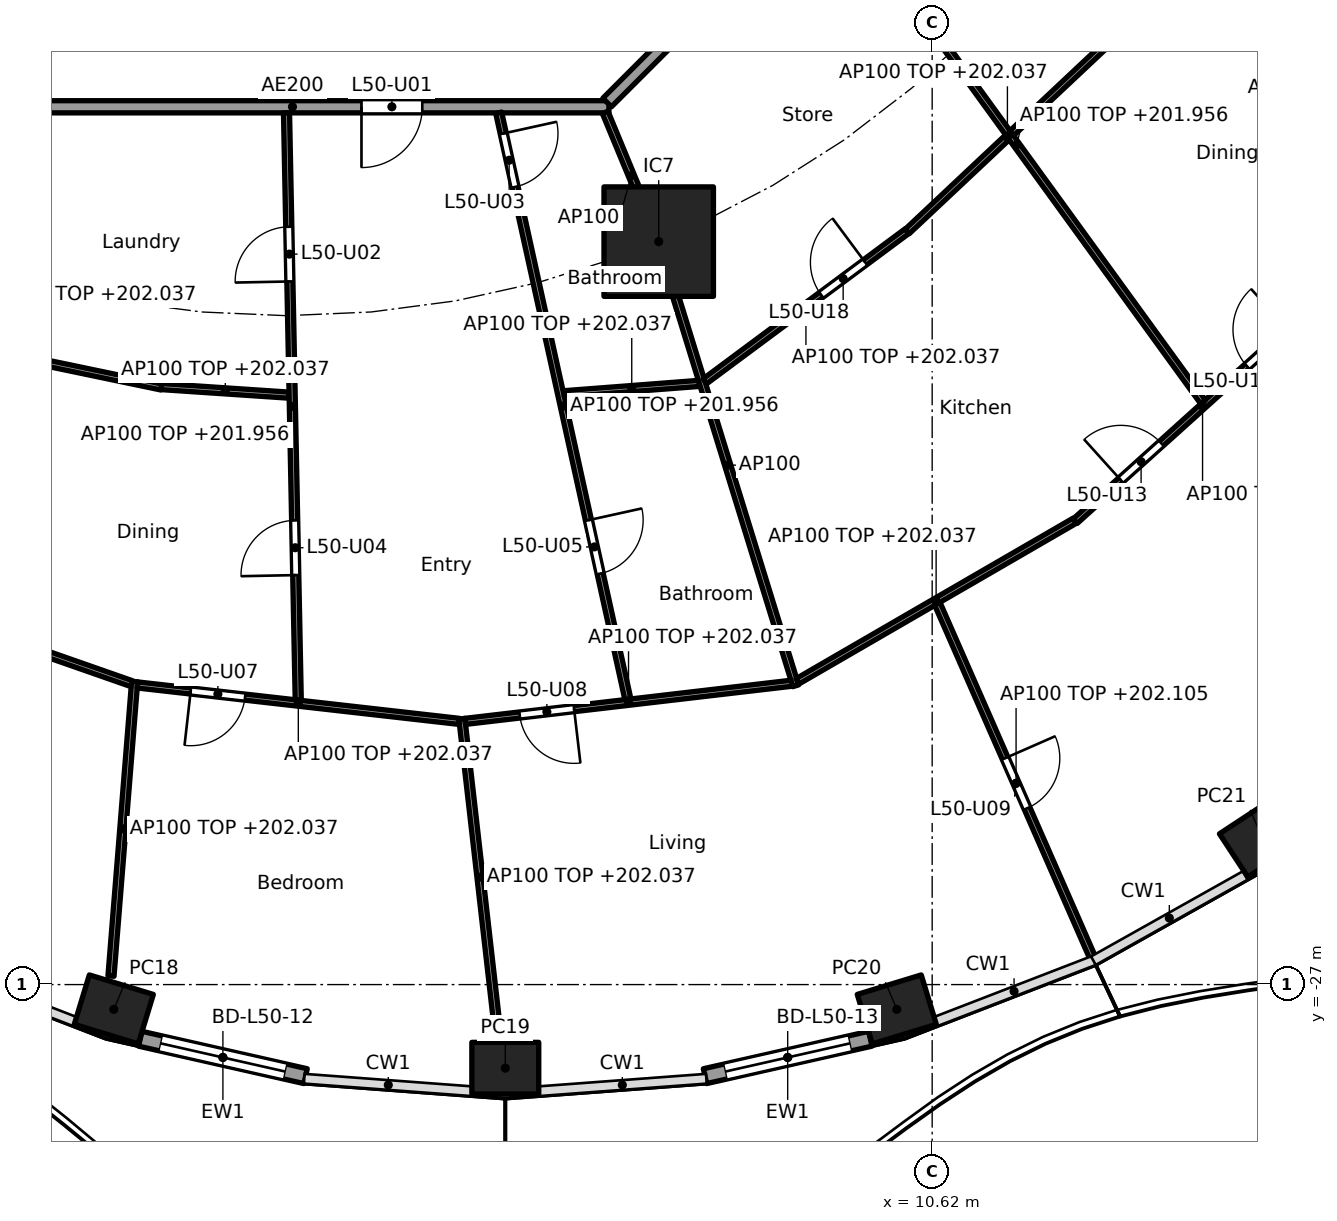
"""IFC4 building model, lengths in metres.
Left out: names, types, materials, properties, quantities, classifications, styles, units other than length and angle.
Written with IfcOpenShell. Run it as: python <this file> out.ifc"""

import sys

from ifc_helpers import new_model, si_unit, direction, frame, frame_2d, origin, origin_2d, place, context, subcontext, project, spatial, rectangle, hollow_rectangle, extrude, element, fill, save


model = new_model("IFC4")
c1 = context("Model", 3, precision=1e-05, world=origin(), true_north=direction((0.0, 1.0)))
c2 = subcontext(c1, "Body", "Model", "MODEL_VIEW")
j1 = project(units=[si_unit("LENGTHUNIT", "METRE"), si_unit("PLANEANGLEUNIT", "RADIAN")], contexts=[c1])
p1 = place(None, origin())
s1 = spatial("IfcSite", under=j1, at=p1, CompositionType="ELEMENT")
p2 = place(p1, origin())
s2 = spatial("IfcBuilding", under=s1, at=p2, CompositionType="ELEMENT")
p3 = place(p2, frame((0.0, 0.0, 199.2)))
s3 = spatial("IfcBuildingStorey", under=s2, at=p3, CompositionType="ELEMENT", Elevation=199.2)
for number, where, z_axis, x_axis in (
    (1, (-2.838, -27.408, 0.0), (0.0, 0.0, 1.0), (0.957, -0.292, 0.0)),
    (2, (3.6, -28.375, 0.0), (0.0, 0.0, 1.0), (1.0, 0.0, 0.0)),
    (3, (10.038, -27.408, 0.0), (0.0, 0.0, 1.0), (0.957, 0.292, 0.0)),
    (4, (16.038, -24.573, 0.0), (0.0, 0.0, 1.0), (0.836, 0.549, 0.0)),
):
    element("IfcColumn", number, at=place(p3, frame(where, z_axis=z_axis, x_axis=x_axis)), inside=s3, PredefinedType="COLUMN", context=c2, shape_type="SweptSolid", body=[
        extrude(hollow_rectangle(XDim=1.1, YDim=0.85, WallThickness=0.036, at=origin_2d()), origin(), (0.0, 0.0, 1.0), 3.7),
    ])
p4 = place(p3, frame((6.123, -14.782, 0.0), z_axis=(0.0, 0.0, 1.0), x_axis=(1.0, 0.0, 0.0)))
e5 = element("IfcColumn", 5, at=p4, inside=s3, PredefinedType="COLUMN", context=c2, shape_type="SweptSolid", body=[
    extrude(rectangle(XDim=1.8, YDim=1.8, at=origin_2d()), origin(), (0.0, 0.0, 1.0), 3.7),
])
p5 = place(p3, frame((0.315, -28.506, 0.0), z_axis=(0.0, 0.0, 1.0), x_axis=(-0.975324329911, 0.220776926974, 0.0)))
e6 = element("IfcWall", 6, at=p5, inside=s3, PredefinedType="SOLIDWALL", context=c2, shape_type="SweptSolid", body=[
    extrude(rectangle(XDim=2.788, YDim=0.25, at=frame_2d((1.394, 0.0))), origin(), (0.0, 0.0, 1.0), 3.44),
])
p6 = place(p5, frame((0.344, 0.0, 0.0)))
e7 = element("IfcOpeningElement", 7, at=p6, cuts=e6, PredefinedType="OPENING", context=c2, shape_type="SweptSolid", body=[
    extrude(rectangle(XDim=2.1, YDim=2.4, at=frame_2d((1.05, 1.2))), frame((0.0, 0.135, 0.0), z_axis=(0.0, -1.0, 0.0), x_axis=(1.0, 0.0, 0.0)), (0.0, 0.0, 1.0), 0.27),
])
p7 = place(p3, frame((9.604, -27.891, 0.0), z_axis=(0.0, 0.0, 1.0), x_axis=(-0.975324329911, -0.220776926974, 0.0)))
e8 = element("IfcWall", 8, at=p7, inside=s3, PredefinedType="SOLIDWALL", context=c2, shape_type="SweptSolid", body=[
    extrude(rectangle(XDim=2.788, YDim=0.25, at=frame_2d((1.394, 0.0))), origin(), (0.0, 0.0, 1.0), 3.44),
])
p8 = place(p7, frame((0.344, 0.0, 0.0)))
e9 = element("IfcOpeningElement", 9, at=p8, cuts=e8, PredefinedType="OPENING", context=c2, shape_type="SweptSolid", body=[
    extrude(rectangle(XDim=2.1, YDim=2.4, at=frame_2d((1.05, 1.2))), frame((0.0, 0.135, 0.0), z_axis=(0.0, -1.0, 0.0), x_axis=(1.0, 0.0, 0.0)), (0.0, 0.0, 1.0), 0.27),
])
p9 = place(p3, frame((-5.104, -12.565, 0.0), z_axis=(0.0, 0.0, 1.0), x_axis=(1.0, 0.0, 0.0)))
e10 = element("IfcWall", 10, at=p9, inside=s3, PredefinedType="PARTITIONING", context=c2, shape_type="SweptSolid", body=[
    extrude(rectangle(XDim=10.409, YDim=0.2, at=frame_2d((5.205, 0.0))), origin(), (0.0, 0.0, 1.0), 3.44),
])
p10 = place(p9, frame((6.339, 0.0, 0.0)))
e11 = element("IfcOpeningElement", 11, at=p10, cuts=e10, PredefinedType="OPENING", context=c2, shape_type="SweptSolid", body=[
    extrude(rectangle(XDim=1.0, YDim=2.1, at=frame_2d((0.5, 1.05))), frame((0.0, 0.11, 0.0), z_axis=(0.0, -1.0, 0.0), x_axis=(1.0, 0.0, 0.0)), (0.0, 0.0, 1.0), 0.22),
])
p11 = place(p3, frame((5.275, -12.494, 0.0), z_axis=(0.0, 0.0, 1.0), x_axis=(0.707106781187, 0.707106781187, 0.0)))
e12 = element("IfcWall", 12, at=p11, inside=s3, PredefinedType="PARTITIONING", context=c2, shape_type="SweptSolid", body=[
    extrude(rectangle(XDim=10.409, YDim=0.2, at=frame_2d((5.205, 0.0))), origin(), (0.0, 0.0, 1.0), 3.44),
])
p12 = place(p3, frame((-6.447, -16.256, 0.0), z_axis=(0.0, 0.0, 1.0), x_axis=(0.978902917122, -0.20432591331, 0.0)))
e13 = element("IfcWall", 13, at=p12, inside=s3, PredefinedType="PARTITIONING", context=c2, shape_type="SweptSolid", body=[
    extrude(rectangle(XDim=4.486, YDim=0.1, at=frame_2d((2.243, 0.0))), origin(), (0.0, 0.0, 1.0), 2.837),
])
p13 = place(p3, frame((-7.613, -20.278, 0.0), z_axis=(0.0, 0.0, 1.0), x_axis=(0.94391294884, -0.330194404878, 0.0)))
e14 = element("IfcWall", 14, at=p13, inside=s3, PredefinedType="PARTITIONING", context=c2, shape_type="SweptSolid", body=[
    extrude(rectangle(XDim=5.367, YDim=0.1, at=frame_2d((2.684, 0.0))), origin(), (0.0, 0.0, 1.0), 2.837),
])
p14 = place(p13, frame((2.234, 0.0, 0.0)))
e15 = element("IfcOpeningElement", 15, at=p14, cuts=e14, PredefinedType="OPENING", context=c2, shape_type="SweptSolid", body=[
    extrude(rectangle(XDim=0.9, YDim=2.1, at=frame_2d((0.45, 1.05))), frame((0.0, 0.06, 0.0), z_axis=(0.0, -1.0, 0.0), x_axis=(1.0, 0.0, 0.0)), (0.0, 0.0, 1.0), 0.12),
])
p15 = place(p3, frame((-2.055, -17.166, 0.0), z_axis=(0.0, 0.0, 1.0), x_axis=(0.997756833447, -0.06694252243, 0.0)))
e16 = element("IfcWall", 16, at=p15, inside=s3, PredefinedType="PARTITIONING", context=c2, shape_type="SweptSolid", body=[
    extrude(rectangle(XDim=2.104, YDim=0.1, at=frame_2d((1.052, 0.0))), origin(), (0.0, 0.0, 1.0), 2.837),
])
p16 = place(p3, frame((-2.495, -22.017, 0.0), z_axis=(0.0, 0.0, 1.0), x_axis=(-0.080150660566, -0.99678276049, 0.0)))
e17 = element("IfcWall", 17, at=p16, inside=s3, PredefinedType="PARTITIONING", context=c2, shape_type="SweptSolid", body=[
    extrude(rectangle(XDim=4.858, YDim=0.1, at=frame_2d((2.429, 0.0))), origin(), (0.0, 0.0, 1.0), 2.837),
])
p17 = place(p3, frame((-2.449, -22.073, 0.0), z_axis=(0.0, 0.0, 1.0), x_axis=(0.993660315081, -0.112424099879, 0.0)))
e18 = element("IfcWall", 18, at=p17, inside=s3, PredefinedType="PARTITIONING", context=c2, shape_type="SweptSolid", body=[
    extrude(rectangle(XDim=5.325, YDim=0.1, at=frame_2d((2.662, 0.0))), origin(), (0.0, 0.0, 1.0), 2.837),
])
p18 = place(p17, frame((0.881, 0.0, 0.0)))
e19 = element("IfcOpeningElement", 19, at=p18, cuts=e18, PredefinedType="OPENING", context=c2, shape_type="SweptSolid", body=[
    extrude(rectangle(XDim=0.9, YDim=2.1, at=frame_2d((0.45, 1.05))), frame((0.0, 0.06, 0.0), z_axis=(0.0, -1.0, 0.0), x_axis=(1.0, 0.0, 0.0)), (0.0, 0.0, 1.0), 0.12),
])
p19 = place(p3, frame((0.002, -12.665, 0.0), z_axis=(0.0, 0.0, 1.0), x_axis=(0.019992969345, -0.999800120613, 0.0)))
e20 = element("IfcWall", 20, at=p19, inside=s3, PredefinedType="PARTITIONING", context=c2, shape_type="SweptSolid", body=[
    extrude(rectangle(XDim=9.659, YDim=0.1, at=frame_2d((4.83, 0.0))), origin(), (0.0, 0.0, 1.0), 2.756),
])
p20 = place(p19, frame((1.873, 0.0, 0.0)))
e21 = element("IfcOpeningElement", 21, at=p20, cuts=e20, PredefinedType="OPENING", context=c2, shape_type="SweptSolid", body=[
    extrude(rectangle(XDim=0.9, YDim=2.1, at=frame_2d((0.45, 1.05))), frame((0.0, 0.06, 0.0), z_axis=(0.0, -1.0, 0.0), x_axis=(1.0, 0.0, 0.0)), (0.0, 0.0, 1.0), 0.12),
])
p21 = place(p19, frame((6.703, 0.0, 0.0)))
e22 = element("IfcOpeningElement", 22, at=p21, cuts=e20, PredefinedType="OPENING", context=c2, shape_type="SweptSolid", body=[
    extrude(rectangle(XDim=0.9, YDim=2.1, at=frame_2d((0.45, 1.05))), frame((0.0, 0.06, 0.0), z_axis=(0.0, -1.0, 0.0), x_axis=(1.0, 0.0, 0.0)), (0.0, 0.0, 1.0), 0.12),
])
p22 = place(p3, frame((2.885, -22.627, 0.0), z_axis=(0.0, 0.0, 1.0), x_axis=(0.113634556485, -0.993522615531, 0.0)))
e23 = element("IfcWall", 23, at=p22, inside=s3, PredefinedType="PARTITIONING", context=c2, shape_type="SweptSolid", body=[
    extrude(rectangle(XDim=5.244, YDim=0.1, at=frame_2d((2.622, 0.0))), origin(), (0.0, 0.0, 1.0), 2.837),
])
p23 = place(p3, frame((2.941, -22.671, 0.0), z_axis=(0.0, 0.0, 1.0), x_axis=(0.993245806382, 0.1160291692, 0.0)))
e24 = element("IfcWall", 24, at=p23, inside=s3, PredefinedType="PARTITIONING", context=c2, shape_type="SweptSolid", body=[
    extrude(rectangle(XDim=5.408, YDim=0.1, at=frame_2d((2.704, 0.0))), origin(), (0.0, 0.0, 1.0), 2.837),
])
p24 = place(p23, frame((0.902, 0.0, 0.0)))
e25 = element("IfcOpeningElement", 25, at=p24, cuts=e24, PredefinedType="OPENING", context=c2, shape_type="SweptSolid", body=[
    extrude(rectangle(XDim=0.9, YDim=2.1, at=frame_2d((0.45, 1.05))), frame((0.0, 0.06, 0.0), z_axis=(0.0, -1.0, 0.0), x_axis=(1.0, 0.0, 0.0)), (0.0, 0.0, 1.0), 0.12),
])
p25 = place(p3, frame((3.491, -12.662, 0.0), z_axis=(0.0, 0.0, 1.0), x_axis=(0.215082442833, -0.976595895335, 0.0)))
e26 = element("IfcWall", 26, at=p25, inside=s3, PredefinedType="PARTITIONING", context=c2, shape_type="SweptSolid", body=[
    extrude(rectangle(XDim=9.878, YDim=0.1, at=frame_2d((4.939, 0.0))), origin(), (0.0, 0.0, 1.0), 2.756),
])
p26 = place(p25, frame((0.35, 0.0, 0.0)))
e27 = element("IfcOpeningElement", 27, at=p26, cuts=e26, PredefinedType="OPENING", context=c2, shape_type="SweptSolid", body=[
    extrude(rectangle(XDim=0.9, YDim=2.1, at=frame_2d((0.45, 1.05))), frame((0.0, 0.06, 0.0), z_axis=(0.0, -1.0, 0.0), x_axis=(1.0, 0.0, 0.0)), (0.0, 0.0, 1.0), 0.12),
])
p27 = place(p25, frame((6.861, 0.0, 0.0)))
e28 = element("IfcOpeningElement", 28, at=p27, cuts=e26, PredefinedType="OPENING", context=c2, shape_type="SweptSolid", body=[
    extrude(rectangle(XDim=0.9, YDim=2.1, at=frame_2d((0.45, 1.05))), frame((0.0, 0.06, 0.0), z_axis=(0.0, -1.0, 0.0), x_axis=(1.0, 0.0, 0.0)), (0.0, 0.0, 1.0), 0.12),
])
p28 = place(p3, frame((4.568, -17.284, 0.0), z_axis=(0.0, 0.0, 1.0), x_axis=(0.997076339393, 0.076411867029, 0.0)))
e29 = element("IfcWall", 29, at=p28, inside=s3, PredefinedType="PARTITIONING", context=c2, shape_type="SweptSolid", body=[
    extrude(rectangle(XDim=2.23, YDim=0.1, at=frame_2d((1.115, 0.0))), origin(), (0.0, 0.0, 1.0), 2.837),
])
p29 = place(p3, frame((5.243, -12.657, 0.0), z_axis=(0.0, 0.0, 1.0), x_axis=(0.382719158442, -0.923864733477, 0.0)))
e30 = element("IfcWall", 30, at=p29, inside=s3, PredefinedType="PARTITIONING", context=c2, shape_type="SweptSolid", body=[
    extrude(rectangle(XDim=2.25, YDim=0.1, at=frame_2d((1.125, 0.0))), origin(), (0.0, 0.0, 1.0), 3.44),
])
p30 = place(p3, frame((6.138, -14.83, 0.0), z_axis=(0.0, 0.0, 1.0), x_axis=(0.294822274121, -0.955552105687, 0.0)))
e31 = element("IfcWall", 31, at=p30, inside=s3, PredefinedType="PARTITIONING", context=c2, shape_type="SweptSolid", body=[
    extrude(rectangle(XDim=7.594, YDim=0.1, at=frame_2d((3.797, 0.0))), origin(), (0.0, 0.0, 1.0), 3.44),
])
p31 = place(p3, frame((6.881, -17.08, 0.0), z_axis=(0.0, 0.0, 1.0), x_axis=(0.802784956441, 0.596268659005, 0.0)))
e32 = element("IfcWall", 32, at=p31, inside=s3, PredefinedType="PARTITIONING", context=c2, shape_type="SweptSolid", body=[
    extrude(rectangle(XDim=4.142, YDim=0.1, at=frame_2d((2.071, 0.0))), origin(), (0.0, 0.0, 1.0), 2.837),
])
p32 = place(p31, frame((2.384, 0.0, 0.0)))
e33 = element("IfcOpeningElement", 33, at=p32, cuts=e32, PredefinedType="OPENING", context=c2, shape_type="SweptSolid", body=[
    extrude(rectangle(XDim=0.9, YDim=2.1, at=frame_2d((0.45, 1.05))), frame((0.0, 0.06, 0.0), z_axis=(0.0, -1.0, 0.0), x_axis=(1.0, 0.0, 0.0)), (0.0, 0.0, 1.0), 0.12),
])
p33 = place(p3, frame((8.405, -22.013, 0.0), z_axis=(0.0, 0.0, 1.0), x_axis=(0.865277177388, 0.501293732547, 0.0)))
e34 = element("IfcWall", 34, at=p33, inside=s3, PredefinedType="PARTITIONING", context=c2, shape_type="SweptSolid", body=[
    extrude(rectangle(XDim=5.27, YDim=0.1, at=frame_2d((2.635, 0.0))), origin(), (0.0, 0.0, 1.0), 2.837),
])
p34 = place(p3, frame((10.705, -20.738, 0.0), z_axis=(0.0, 0.0, 1.0), x_axis=(0.401740633891, -0.915753494714, 0.0)))
e35 = element("IfcWall", 35, at=p34, inside=s3, PredefinedType="PARTITIONING", context=c2, shape_type="SweptSolid", body=[
    extrude(rectangle(XDim=6.445, YDim=0.1, at=frame_2d((3.223, 0.0))), origin(), (0.0, 0.0, 1.0), 2.905),
])
p35 = place(p34, frame((2.773, 0.0, 0.0)))
e36 = element("IfcOpeningElement", 36, at=p35, cuts=e35, PredefinedType="OPENING", context=c2, shape_type="SweptSolid", body=[
    extrude(rectangle(XDim=0.9, YDim=2.1, at=frame_2d((0.45, 1.05))), frame((0.0, 0.06, 0.0), z_axis=(0.0, -1.0, 0.0), x_axis=(1.0, 0.0, 0.0)), (0.0, 0.0, 1.0), 0.12),
])
p36 = place(p3, frame((10.21, -14.614, 0.0), z_axis=(0.0, 0.0, 1.0), x_axis=(0.728883199496, 0.684638066055, 0.0)))
e37 = element("IfcWall", 37, at=p36, inside=s3, PredefinedType="PARTITIONING", context=c2, shape_type="SweptSolid", body=[
    extrude(rectangle(XDim=4.519, YDim=0.1, at=frame_2d((2.26, 0.0))), origin(), (0.0, 0.0, 1.0), 2.837),
])
p37 = place(p3, frame((12.971, -19.38, 0.0), z_axis=(0.0, 0.0, 1.0), x_axis=(0.742768881471, 0.669547898748, 0.0)))
e38 = element("IfcWall", 38, at=p37, inside=s3, PredefinedType="PARTITIONING", context=c2, shape_type="SweptSolid", body=[
    extrude(rectangle(XDim=5.642, YDim=0.1, at=frame_2d((2.821, 0.0))), origin(), (0.0, 0.0, 1.0), 2.837),
])
p38 = place(p37, frame((1.01, 0.0, 0.0)))
e39 = element("IfcOpeningElement", 39, at=p38, cuts=e38, PredefinedType="OPENING", context=c2, shape_type="SweptSolid", body=[
    extrude(rectangle(XDim=0.9, YDim=2.1, at=frame_2d((0.45, 1.05))), frame((0.0, 0.06, 0.0), z_axis=(0.0, -1.0, 0.0), x_axis=(1.0, 0.0, 0.0)), (0.0, 0.0, 1.0), 0.12),
])
p39 = place(p37, frame((3.806, 0.0, 0.0)))
e40 = element("IfcOpeningElement", 40, at=p39, cuts=e38, PredefinedType="OPENING", context=c2, shape_type="SweptSolid", body=[
    extrude(rectangle(XDim=0.9, YDim=2.1, at=frame_2d((0.45, 1.05))), frame((0.0, 0.06, 0.0), z_axis=(0.0, -1.0, 0.0), x_axis=(1.0, 0.0, 0.0)), (0.0, 0.0, 1.0), 0.12),
])
p40 = place(p3, frame((8.943, -8.966, 0.0), z_axis=(0.0, 0.0, 1.0), x_axis=(0.587181355751, -0.809455406714, 0.0)))
e41 = element("IfcWall", 41, at=p40, inside=s3, PredefinedType="PARTITIONING", context=c2, shape_type="SweptSolid", body=[
    extrude(rectangle(XDim=10.441, YDim=0.1, at=frame_2d((5.221, 0.0))), origin(), (0.0, 0.0, 1.0), 2.756),
])
p41 = place(p6, origin())
e42 = element("IfcDoor", 42, at=p41, inside=s3, OperationType="SLIDING_TO_LEFT", PredefinedType="DOOR", context=c2, shape_type="SweptSolid", body=[
    extrude(rectangle(XDim=2.1, YDim=2.4, at=frame_2d((1.05, 1.2))), frame((0.0, 0.025, 0.0), z_axis=(0.0, -1.0, 0.0), x_axis=(1.0, 0.0, 0.0)), (0.0, 0.0, 1.0), 0.05),
])
fill(e7, e42)
p42 = place(p8, origin())
e43 = element("IfcDoor", 43, at=p42, inside=s3, OperationType="SLIDING_TO_LEFT", PredefinedType="DOOR", context=c2, shape_type="SweptSolid", body=[
    extrude(rectangle(XDim=2.1, YDim=2.4, at=frame_2d((1.05, 1.2))), frame((0.0, 0.025, 0.0), z_axis=(0.0, -1.0, 0.0), x_axis=(1.0, 0.0, 0.0)), (0.0, 0.0, 1.0), 0.05),
])
fill(e9, e43)
p43 = place(p10, frame((1.0, 0.0, 0.0), x_axis=(-1.0, 0.0, 0.0)))
e44 = element("IfcDoor", 44, at=p43, inside=s3, OperationType="SINGLE_SWING_RIGHT", PredefinedType="DOOR", context=c2, shape_type="SweptSolid", body=[
    extrude(rectangle(XDim=1.0, YDim=2.1, at=frame_2d((0.5, 1.05))), frame((0.0, 0.025, 0.0), z_axis=(0.0, -1.0, 0.0), x_axis=(1.0, 0.0, 0.0)), (0.0, 0.0, 1.0), 0.05),
])
fill(e11, e44)
p44 = place(p20, frame((0.9, 0.0, 0.0), x_axis=(-1.0, 0.0, 0.0)))
e45 = element("IfcDoor", 45, at=p44, inside=s3, OperationType="SINGLE_SWING_LEFT", PredefinedType="DOOR", context=c2, shape_type="SweptSolid", body=[
    extrude(rectangle(XDim=0.9, YDim=2.1, at=frame_2d((0.45, 1.05))), frame((0.0, 0.025, 0.0), z_axis=(0.0, -1.0, 0.0), x_axis=(1.0, 0.0, 0.0)), (0.0, 0.0, 1.0), 0.05),
])
fill(e21, e45)
p45 = place(p26, origin())
e46 = element("IfcDoor", 46, at=p45, inside=s3, OperationType="SINGLE_SWING_LEFT", PredefinedType="DOOR", context=c2, shape_type="SweptSolid", body=[
    extrude(rectangle(XDim=0.9, YDim=2.1, at=frame_2d((0.45, 1.05))), frame((0.0, 0.025, 0.0), z_axis=(0.0, -1.0, 0.0), x_axis=(1.0, 0.0, 0.0)), (0.0, 0.0, 1.0), 0.05),
])
fill(e27, e46)
p46 = place(p21, frame((0.9, 0.0, 0.0), x_axis=(-1.0, 0.0, 0.0)))
e47 = element("IfcDoor", 47, at=p46, inside=s3, OperationType="SINGLE_SWING_LEFT", PredefinedType="DOOR", context=c2, shape_type="SweptSolid", body=[
    extrude(rectangle(XDim=0.9, YDim=2.1, at=frame_2d((0.45, 1.05))), frame((0.0, 0.025, 0.0), z_axis=(0.0, -1.0, 0.0), x_axis=(1.0, 0.0, 0.0)), (0.0, 0.0, 1.0), 0.05),
])
fill(e22, e47)
p47 = place(p27, origin())
e48 = element("IfcDoor", 48, at=p47, inside=s3, OperationType="SINGLE_SWING_LEFT", PredefinedType="DOOR", context=c2, shape_type="SweptSolid", body=[
    extrude(rectangle(XDim=0.9, YDim=2.1, at=frame_2d((0.45, 1.05))), frame((0.0, 0.025, 0.0), z_axis=(0.0, -1.0, 0.0), x_axis=(1.0, 0.0, 0.0)), (0.0, 0.0, 1.0), 0.05),
])
fill(e28, e48)
p48 = place(p18, frame((0.9, 0.0, 0.0), x_axis=(-1.0, 0.0, 0.0)))
e49 = element("IfcDoor", 49, at=p48, inside=s3, OperationType="SINGLE_SWING_RIGHT", PredefinedType="DOOR", context=c2, shape_type="SweptSolid", body=[
    extrude(rectangle(XDim=0.9, YDim=2.1, at=frame_2d((0.45, 1.05))), frame((0.0, 0.025, 0.0), z_axis=(0.0, -1.0, 0.0), x_axis=(1.0, 0.0, 0.0)), (0.0, 0.0, 1.0), 0.05),
])
fill(e19, e49)
p49 = place(p24, frame((0.9, 0.0, 0.0), x_axis=(-1.0, 0.0, 0.0)))
e50 = element("IfcDoor", 50, at=p49, inside=s3, OperationType="SINGLE_SWING_LEFT", PredefinedType="DOOR", context=c2, shape_type="SweptSolid", body=[
    extrude(rectangle(XDim=0.9, YDim=2.1, at=frame_2d((0.45, 1.05))), frame((0.0, 0.025, 0.0), z_axis=(0.0, -1.0, 0.0), x_axis=(1.0, 0.0, 0.0)), (0.0, 0.0, 1.0), 0.05),
])
fill(e25, e50)
p50 = place(p35, origin())
e51 = element("IfcDoor", 51, at=p50, inside=s3, OperationType="SINGLE_SWING_LEFT", PredefinedType="DOOR", context=c2, shape_type="SweptSolid", body=[
    extrude(rectangle(XDim=0.9, YDim=2.1, at=frame_2d((0.45, 1.05))), frame((0.0, 0.025, 0.0), z_axis=(0.0, -1.0, 0.0), x_axis=(1.0, 0.0, 0.0)), (0.0, 0.0, 1.0), 0.05),
])
fill(e36, e51)
p51 = place(p38, origin())
e52 = element("IfcDoor", 52, at=p51, inside=s3, OperationType="SINGLE_SWING_LEFT", PredefinedType="DOOR", context=c2, shape_type="SweptSolid", body=[
    extrude(rectangle(XDim=0.9, YDim=2.1, at=frame_2d((0.45, 1.05))), frame((0.0, 0.025, 0.0), z_axis=(0.0, -1.0, 0.0), x_axis=(1.0, 0.0, 0.0)), (0.0, 0.0, 1.0), 0.05),
])
fill(e39, e52)
p52 = place(p39, origin())
e53 = element("IfcDoor", 53, at=p52, inside=s3, OperationType="SINGLE_SWING_RIGHT", PredefinedType="DOOR", context=c2, shape_type="SweptSolid", body=[
    extrude(rectangle(XDim=0.9, YDim=2.1, at=frame_2d((0.45, 1.05))), frame((0.0, 0.025, 0.0), z_axis=(0.0, -1.0, 0.0), x_axis=(1.0, 0.0, 0.0)), (0.0, 0.0, 1.0), 0.05),
])
fill(e40, e53)
p53 = place(p32, origin())
e54 = element("IfcDoor", 54, at=p53, inside=s3, OperationType="SINGLE_SWING_RIGHT", PredefinedType="DOOR", context=c2, shape_type="SweptSolid", body=[
    extrude(rectangle(XDim=0.9, YDim=2.1, at=frame_2d((0.45, 1.05))), frame((0.0, 0.025, 0.0), z_axis=(0.0, -1.0, 0.0), x_axis=(1.0, 0.0, 0.0)), (0.0, 0.0, 1.0), 0.05),
])
fill(e33, e54)
save(model, sys.argv[1])
